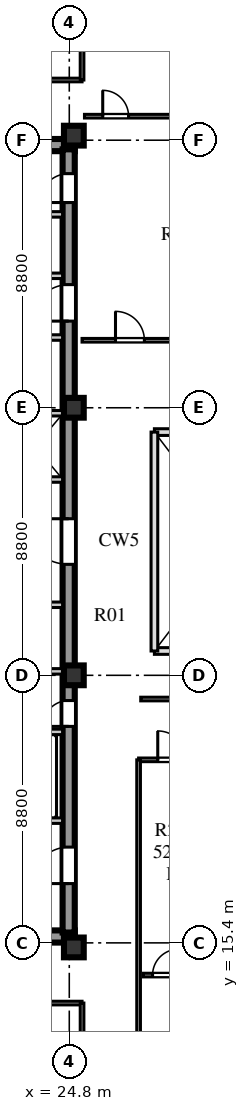
"""IFC4 building model, lengths in metres.
Left out: names, types, materials, properties, quantities, classifications, styles, units other than length and angle.
Written with IfcOpenShell. Run it as: python <this file> out.ifc"""

import sys

from ifc_helpers import new_model, si_unit, direction, frame, frame_2d, origin, origin_2d, place, context, subcontext, project, spatial, rectangle, extrude, element, fill, save


model = new_model("IFC4")
c1 = context("Model", 3, precision=1e-05, world=origin(), true_north=direction((0.0, 1.0)))
c2 = subcontext(c1, "Body", "Model", "MODEL_VIEW")
j1 = project(units=[si_unit("LENGTHUNIT", "METRE"), si_unit("PLANEANGLEUNIT", "RADIAN")], contexts=[c1])
p1 = place(None, origin())
s1 = spatial("IfcSite", under=j1, at=p1, CompositionType="ELEMENT")
p2 = place(p1, origin())
s2 = spatial("IfcBuilding", under=s1, at=p2, CompositionType="ELEMENT")
p3 = place(p2, frame((0.0, 0.0, 214.1)))
s3 = spatial("IfcBuildingStorey", under=s2, at=p3, CompositionType="ELEMENT", Elevation=214.1)
for number, where, z_axis, x_axis in (
    (1, (15.5, 15.61, 0.0), (0.0, 0.0, 1.0), (1.0, 0.0, 0.0)),
    (2, (15.5, 41.64, 0.0), (0.0, 0.0, 1.0), (1.0, 0.0, 0.0)),
):
    element("IfcWall", number, at=place(p3, frame(where, z_axis=z_axis, x_axis=x_axis)), inside=s3, PredefinedType="SHEAR", context=c2, shape_type="SweptSolid", body=[
        extrude(rectangle(XDim=9.48, YDim=0.4, at=frame_2d((4.74, 0.0))), origin(), (0.0, 0.0, 1.0), 3.66),
    ])
p4 = place(p3, frame((24.78, 15.74, 0.0), z_axis=(0.0, 0.0, 1.0), x_axis=(0.0, 1.0, 0.0)))
e3 = element("IfcWall", 3, at=p4, inside=s3, PredefinedType="SHEAR", context=c2, shape_type="SweptSolid", body=[
    extrude(rectangle(XDim=25.76, YDim=0.4, at=frame_2d((12.88, 0.0))), origin(), (0.0, 0.0, 1.0), 3.66),
])
p5 = place(p4, frame((1.61, 0.0, 0.0)))
e4 = element("IfcOpeningElement", 4, at=p5, cuts=e3, PredefinedType="OPENING", context=c2, shape_type="SweptSolid", body=[
    extrude(rectangle(XDim=1.2, YDim=2.1, at=frame_2d((0.6, 1.05))), frame((0.0, 0.21, 0.0), z_axis=(0.0, -1.0, 0.0), x_axis=(1.0, 0.0, 0.0)), (0.0, 0.0, 1.0), 0.42),
])
p6 = place(p4, frame((6.78, 0.0, 0.0)))
e5 = element("IfcOpeningElement", 5, at=p6, cuts=e3, PredefinedType="OPENING", context=c2, shape_type="SweptSolid", body=[
    extrude(rectangle(XDim=0.85, YDim=2.06, at=frame_2d((0.425, 1.03))), frame((0.0, 0.21, 0.0), z_axis=(0.0, -1.0, 0.0), x_axis=(1.0, 0.0, 0.0)), (0.0, 0.0, 1.0), 0.42),
])
p7 = place(p4, frame((12.11, 0.0, 0.0)))
e6 = element("IfcOpeningElement", 6, at=p7, cuts=e3, PredefinedType="OPENING", context=c2, shape_type="SweptSolid", body=[
    extrude(rectangle(XDim=1.5, YDim=2.12, at=frame_2d((0.75, 1.06))), frame((0.0, 0.21, 0.0), z_axis=(0.0, -1.0, 0.0), x_axis=(1.0, 0.0, 0.0)), (0.0, 0.0, 1.0), 0.42),
])
p8 = place(p4, frame((20.11, 0.0, 0.0)))
e7 = element("IfcOpeningElement", 7, at=p8, cuts=e3, PredefinedType="OPENING", context=c2, shape_type="SweptSolid", body=[
    extrude(rectangle(XDim=1.2, YDim=2.12, at=frame_2d((0.6, 1.06))), frame((0.0, 0.21, 0.0), z_axis=(0.0, -1.0, 0.0), x_axis=(1.0, 0.0, 0.0)), (0.0, 0.0, 1.0), 0.42),
])
p9 = place(p4, frame((24.01, 0.0, 0.0)))
e8 = element("IfcOpeningElement", 8, at=p9, cuts=e3, PredefinedType="OPENING", context=c2, shape_type="SweptSolid", body=[
    extrude(rectangle(XDim=0.95, YDim=2.1, at=frame_2d((0.475, 1.05))), frame((0.0, 0.21, 0.0), z_axis=(0.0, -1.0, 0.0), x_axis=(1.0, 0.0, 0.0)), (0.0, 0.0, 1.0), 0.42),
])
for number, where, z_axis, x_axis in (
    (9, (24.95, 15.25, 0.0), (0.0, 0.0, 1.0), (1.0, 0.0, 0.0)),
    (10, (24.95, 24.2, 0.0), (0.0, 0.0, 1.0), (1.0, 0.0, 0.0)),
    (11, (24.95, 33.0, 0.0), (0.0, 0.0, 1.0), (1.0, 0.0, 0.0)),
    (12, (24.95, 41.95, 0.0), (0.0, 0.0, 1.0), (1.0, 0.0, 0.0)),
):
    element("IfcColumn", number, at=place(p3, frame(where, z_axis=z_axis, x_axis=x_axis)), inside=s3, PredefinedType="COLUMN", context=c2, shape_type="SweptSolid", body=[
        extrude(rectangle(XDim=0.65, YDim=0.65, at=origin_2d()), origin(), (0.0, 0.0, 1.0), 3.66),
    ])
p10 = place(p3, frame((19.64, 19.42, 0.0), z_axis=(0.0, 0.0, 1.0), x_axis=(1.0, 0.0, 0.0)))
e13 = element("IfcWall", 13, at=p10, inside=s3, PredefinedType="SOLIDWALL", context=c2, shape_type="SweptSolid", body=[
    extrude(rectangle(XDim=4.94, YDim=0.18, at=frame_2d((2.47, 0.0))), origin(), (0.0, 0.0, 1.0), 3.66),
])
p11 = place(p10, frame((0.72, 0.0, 0.0)))
e14 = element("IfcOpeningElement", 14, at=p11, cuts=e13, PredefinedType="OPENING", context=c2, shape_type="SweptSolid", body=[
    extrude(rectangle(XDim=1.1, YDim=2.1, at=frame_2d((0.55, 1.05))), frame((0.0, 0.1, 0.0), z_axis=(0.0, -1.0, 0.0), x_axis=(1.0, 0.0, 0.0)), (0.0, 0.0, 1.0), 0.2),
])
p12 = place(p10, frame((3.02, 0.0, 0.0)))
e15 = element("IfcOpeningElement", 15, at=p12, cuts=e13, PredefinedType="OPENING", context=c2, shape_type="SweptSolid", body=[
    extrude(rectangle(XDim=1.1, YDim=2.1, at=frame_2d((0.55, 1.05))), frame((0.0, 0.1, 0.0), z_axis=(0.0, -1.0, 0.0), x_axis=(1.0, 0.0, 0.0)), (0.0, 0.0, 1.0), 0.2),
])
p13 = place(p3, frame((19.64, 22.34, 0.0), z_axis=(0.0, 0.0, 1.0), x_axis=(1.0, 0.0, 0.0)))
e16 = element("IfcWall", 16, at=p13, inside=s3, PredefinedType="SOLIDWALL", context=c2, shape_type="SweptSolid", body=[
    extrude(rectangle(XDim=4.94, YDim=0.18, at=frame_2d((2.47, 0.0))), origin(), (0.0, 0.0, 1.0), 3.66),
])
p14 = place(p3, frame((15.9, 26.52, 0.0), z_axis=(0.0, 0.0, 1.0), x_axis=(1.0, 0.0, 0.0)))
e17 = element("IfcWall", 17, at=p14, inside=s3, PredefinedType="SOLIDWALL", context=c2, shape_type="SweptSolid", body=[
    extrude(rectangle(XDim=8.68, YDim=0.18, at=frame_2d((4.34, 0.0))), origin(), (0.0, 0.0, 1.0), 3.66),
])
p15 = place(p14, frame((2.5, 0.0, 0.0)))
e18 = element("IfcOpeningElement", 18, at=p15, cuts=e17, PredefinedType="OPENING", context=c2, shape_type="SweptSolid", body=[
    extrude(rectangle(XDim=0.95, YDim=2.1, at=frame_2d((0.475, 1.05))), frame((0.0, 0.1, 0.0), z_axis=(0.0, -1.0, 0.0), x_axis=(1.0, 0.0, 0.0)), (0.0, 0.0, 1.0), 0.2),
])
p16 = place(p14, frame((6.0, 0.0, 0.0)))
e19 = element("IfcOpeningElement", 19, at=p16, cuts=e17, PredefinedType="OPENING", context=c2, shape_type="SweptSolid", body=[
    extrude(rectangle(XDim=0.95, YDim=2.1, at=frame_2d((0.475, 1.05))), frame((0.0, 0.1, 0.0), z_axis=(0.0, -1.0, 0.0), x_axis=(1.0, 0.0, 0.0)), (0.0, 0.0, 1.0), 0.2),
])
p17 = place(p3, frame((15.9, 24.33, 0.0), z_axis=(0.0, 0.0, 1.0), x_axis=(1.0, 0.0, 0.0)))
e20 = element("IfcWall", 20, at=p17, inside=s3, PredefinedType="SOLIDWALL", context=c2, shape_type="SweptSolid", body=[
    extrude(rectangle(XDim=8.68, YDim=0.18, at=frame_2d((4.34, 0.0))), origin(), (0.0, 0.0, 1.0), 3.06),
])
p18 = place(p3, frame((15.9, 30.64, 0.0), z_axis=(0.0, 0.0, 1.0), x_axis=(1.0, 0.0, 0.0)))
e21 = element("IfcWall", 21, at=p18, inside=s3, PredefinedType="SOLIDWALL", context=c2, shape_type="SweptSolid", body=[
    extrude(rectangle(XDim=8.68, YDim=0.18, at=frame_2d((4.34, 0.0))), origin(), (0.0, 0.0, 1.0), 3.66),
])
p19 = place(p3, frame((15.9, 32.82, 0.0), z_axis=(0.0, 0.0, 1.0), x_axis=(1.0, 0.0, 0.0)))
e22 = element("IfcWall", 22, at=p19, inside=s3, PredefinedType="SOLIDWALL", context=c2, shape_type="SweptSolid", body=[
    extrude(rectangle(XDim=8.68, YDim=0.18, at=frame_2d((4.34, 0.0))), origin(), (0.0, 0.0, 1.0), 3.06),
])
p20 = place(p3, frame((22.02, 35.31, 0.0), z_axis=(0.0, 0.0, 1.0), x_axis=(1.0, 0.0, 0.0)))
e23 = element("IfcWall", 23, at=p20, inside=s3, PredefinedType="SOLIDWALL", context=c2, shape_type="SweptSolid", body=[
    extrude(rectangle(XDim=2.56, YDim=0.18, at=frame_2d((1.28, 0.0))), origin(), (0.0, 0.0, 1.0), 3.66),
])
p21 = place(p20, frame((0.55, 0.0, 0.0)))
e24 = element("IfcOpeningElement", 24, at=p21, cuts=e23, PredefinedType="OPENING", context=c2, shape_type="SweptSolid", body=[
    extrude(rectangle(XDim=1.0, YDim=2.1, at=frame_2d((0.5, 1.05))), frame((0.0, 0.1, 0.0), z_axis=(0.0, -1.0, 0.0), x_axis=(1.0, 0.0, 0.0)), (0.0, 0.0, 1.0), 0.2),
])
p22 = place(p3, frame((19.64, 37.34, 0.0), z_axis=(0.0, 0.0, 1.0), x_axis=(1.0, 0.0, 0.0)))
e25 = element("IfcWall", 25, at=p22, inside=s3, PredefinedType="SOLIDWALL", context=c2, shape_type="SweptSolid", body=[
    extrude(rectangle(XDim=4.94, YDim=0.18, at=frame_2d((2.47, 0.0))), origin(), (0.0, 0.0, 1.0), 3.66),
])
p23 = place(p22, frame((0.45, 0.0, 0.0)))
e26 = element("IfcOpeningElement", 26, at=p23, cuts=e25, PredefinedType="OPENING", context=c2, shape_type="SweptSolid", body=[
    extrude(rectangle(XDim=1.0, YDim=2.1, at=frame_2d((0.5, 1.05))), frame((0.0, 0.1, 0.0), z_axis=(0.0, -1.0, 0.0), x_axis=(1.0, 0.0, 0.0)), (0.0, 0.0, 1.0), 0.2),
])
p24 = place(p22, frame((2.5, 0.0, 0.0)))
e27 = element("IfcOpeningElement", 27, at=p24, cuts=e25, PredefinedType="OPENING", context=c2, shape_type="SweptSolid", body=[
    extrude(rectangle(XDim=1.0, YDim=2.1, at=frame_2d((0.5, 1.05))), frame((0.0, 0.1, 0.0), z_axis=(0.0, -1.0, 0.0), x_axis=(1.0, 0.0, 0.0)), (0.0, 0.0, 1.0), 0.2),
])
p25 = place(p3, frame((19.64, 39.36, 0.0), z_axis=(0.0, 0.0, 1.0), x_axis=(1.0, 0.0, 0.0)))
e28 = element("IfcWall", 28, at=p25, inside=s3, PredefinedType="SOLIDWALL", context=c2, shape_type="SweptSolid", body=[
    extrude(rectangle(XDim=4.94, YDim=0.18, at=frame_2d((2.47, 0.0))), origin(), (0.0, 0.0, 1.0), 3.66),
])
p26 = place(p3, frame((27.08, 21.42, 0.0), z_axis=(0.0, 0.0, 1.0), x_axis=(1.0, 0.0, 0.0)))
e29 = element("IfcWall", 29, at=p26, inside=s3, PredefinedType="PARTITIONING", context=c2, shape_type="SweptSolid", body=[
    extrude(rectangle(XDim=12.07, YDim=0.12, at=frame_2d((6.035, 0.0))), origin(), (0.0, 0.0, 1.0), 3.31),
])
p27 = place(p26, frame((0.63, 0.0, 0.0)))
e30 = element("IfcOpeningElement", 30, at=p27, cuts=e29, PredefinedType="OPENING", context=c2, shape_type="SweptSolid", body=[
    extrude(rectangle(XDim=0.95, YDim=2.1, at=frame_2d((0.475, 1.05))), frame((0.0, 0.07, 0.0), z_axis=(0.0, -1.0, 0.0), x_axis=(1.0, 0.0, 0.0)), (0.0, 0.0, 1.0), 0.14),
])
p28 = place(p3, frame((27.08, 7.88, 0.0), z_axis=(0.0, 0.0, 1.0), x_axis=(0.0, 1.0, 0.0)))
e31 = element("IfcWall", 31, at=p28, inside=s3, PredefinedType="PARTITIONING", context=c2, shape_type="SweptSolid", body=[
    extrude(rectangle(XDim=13.54, YDim=0.12, at=frame_2d((6.77, 0.0))), origin(), (0.0, 0.0, 1.0), 3.66),
])
p29 = place(p3, frame((27.15, 23.42, 0.0), z_axis=(0.0, 0.0, 1.0), x_axis=(1.0, 0.0, 0.0)))
e32 = element("IfcWall", 32, at=p29, inside=s3, PredefinedType="PARTITIONING", context=c2, shape_type="SweptSolid", body=[
    extrude(rectangle(XDim=6.0, YDim=0.12, at=frame_2d((3.0, 0.0))), origin(), (0.0, 0.0, 1.0), 3.66),
])
p30 = place(p3, frame((25.22, 35.22, 0.0), z_axis=(0.0, 0.0, 1.0), x_axis=(1.0, 0.0, 0.0)))
e33 = element("IfcWall", 33, at=p30, inside=s3, PredefinedType="PARTITIONING", context=c2, shape_type="SweptSolid", body=[
    extrude(rectangle(XDim=9.5, YDim=0.12, at=frame_2d((4.75, 0.0))), origin(), (0.0, 0.0, 1.0), 3.66),
])
p31 = place(p30, frame((1.1, 0.0, 0.0)))
e34 = element("IfcOpeningElement", 34, at=p31, cuts=e33, PredefinedType="OPENING", context=c2, shape_type="SweptSolid", body=[
    extrude(rectangle(XDim=0.95, YDim=2.1, at=frame_2d((0.475, 1.05))), frame((0.0, 0.07, 0.0), z_axis=(0.0, -1.0, 0.0), x_axis=(1.0, 0.0, 0.0)), (0.0, 0.0, 1.0), 0.14),
])
p32 = place(p3, frame((13.4, 13.42, 0.0), z_axis=(0.0, 0.0, 1.0), x_axis=(1.0, 0.0, 0.0)))
e35 = element("IfcWall", 35, at=p32, inside=s3, PredefinedType="PARTITIONING", context=c2, shape_type="SweptSolid", body=[
    extrude(rectangle(XDim=11.82, YDim=0.12, at=frame_2d((5.91, 0.0))), origin(), (0.0, 0.0, 1.0), 3.66),
])
p33 = place(p32, frame((3.2, 0.0, 0.0)))
e36 = element("IfcOpeningElement", 36, at=p33, cuts=e35, PredefinedType="OPENING", context=c2, shape_type="SweptSolid", body=[
    extrude(rectangle(XDim=0.95, YDim=2.08, at=frame_2d((0.475, 1.04))), frame((0.0, 0.07, 0.0), z_axis=(0.0, -1.0, 0.0), x_axis=(1.0, 0.0, 0.0)), (0.0, 0.0, 1.0), 0.14),
])
p34 = place(p3, frame((25.22, 7.88, 0.0), z_axis=(0.0, 0.0, 1.0), x_axis=(0.0, 1.0, 0.0)))
e37 = element("IfcWall", 37, at=p34, inside=s3, PredefinedType="PARTITIONING", context=c2, shape_type="SweptSolid", body=[
    extrude(rectangle(XDim=5.54, YDim=0.12, at=frame_2d((2.77, 0.0))), origin(), (0.0, 0.0, 1.0), 3.21),
])
p35 = place(p3, frame((13.4, 43.78, 0.0), z_axis=(0.0, 0.0, 1.0), x_axis=(1.0, 0.0, 0.0)))
e38 = element("IfcWall", 38, at=p35, inside=s3, PredefinedType="PARTITIONING", context=c2, shape_type="SweptSolid", body=[
    extrude(rectangle(XDim=11.82, YDim=0.12, at=frame_2d((5.91, 0.0))), origin(), (0.0, 0.0, 1.0), 3.66),
])
p36 = place(p35, frame((3.2, 0.0, 0.0)))
e39 = element("IfcOpeningElement", 39, at=p36, cuts=e38, PredefinedType="OPENING", context=c2, shape_type="SweptSolid", body=[
    extrude(rectangle(XDim=0.95, YDim=2.08, at=frame_2d((0.475, 1.04))), frame((0.0, 0.07, 0.0), z_axis=(0.0, -1.0, 0.0), x_axis=(1.0, 0.0, 0.0)), (0.0, 0.0, 1.0), 0.14),
])
p37 = place(p3, frame((25.22, 43.78, 0.0), z_axis=(0.0, 0.0, 1.0), x_axis=(0.0, 1.0, 0.0)))
e40 = element("IfcWall", 40, at=p37, inside=s3, PredefinedType="PARTITIONING", context=c2, shape_type="SweptSolid", body=[
    extrude(rectangle(XDim=5.54, YDim=0.12, at=frame_2d((2.77, 0.0))), origin(), (0.0, 0.0, 1.0), 3.21),
])
p38 = place(p3, frame((27.24, 14.341, 0.0), z_axis=(0.0, 0.0, 1.0), x_axis=(1.0, 0.0, 0.0)))
e41 = element("IfcWall", 41, at=p38, inside=s3, PredefinedType="PARTITIONING", context=c2, shape_type="SweptSolid", body=[
    extrude(rectangle(XDim=11.83, YDim=0.12, at=frame_2d((5.915, 0.0))), origin(), (0.0, 0.0, 1.0), 3.66),
])
p39 = place(p38, frame((0.3, 0.0, 0.0)))
e42 = element("IfcOpeningElement", 42, at=p39, cuts=e41, PredefinedType="OPENING", context=c2, shape_type="SweptSolid", body=[
    extrude(rectangle(XDim=0.85, YDim=2.08, at=frame_2d((0.425, 1.04))), frame((0.0, 0.07, 0.0), z_axis=(0.0, -1.0, 0.0), x_axis=(1.0, 0.0, 0.0)), (0.0, 0.0, 1.0), 0.14),
])
p40 = place(p38, frame((3.135, 0.0, 0.0)))
e43 = element("IfcOpeningElement", 43, at=p40, cuts=e41, PredefinedType="OPENING", context=c2, shape_type="SweptSolid", body=[
    extrude(rectangle(XDim=0.85, YDim=2.08, at=frame_2d((0.425, 1.04))), frame((0.0, 0.07, 0.0), z_axis=(0.0, -1.0, 0.0), x_axis=(1.0, 0.0, 0.0)), (0.0, 0.0, 1.0), 0.14),
])
p41 = place(p3, frame((25.3, 42.59, 0.0), z_axis=(0.0, 0.0, 1.0), x_axis=(1.0, 0.0, 0.0)))
e44 = element("IfcWall", 44, at=p41, inside=s3, PredefinedType="PARTITIONING", context=c2, shape_type="SweptSolid", body=[
    extrude(rectangle(XDim=9.34, YDim=0.12, at=frame_2d((4.67, 0.0))), origin(), (0.0, 0.0, 1.0), 3.66),
])
p42 = place(p41, frame((0.6, 0.0, 0.0)))
e45 = element("IfcOpeningElement", 45, at=p42, cuts=e44, PredefinedType="OPENING", context=c2, shape_type="SweptSolid", body=[
    extrude(rectangle(XDim=0.85, YDim=2.08, at=frame_2d((0.425, 1.04))), frame((0.0, 0.07, 0.0), z_axis=(0.0, -1.0, 0.0), x_axis=(1.0, 0.0, 0.0)), (0.0, 0.0, 1.0), 0.14),
])
p43 = place(p41, frame((3.573, 0.0, 0.0)))
e46 = element("IfcOpeningElement", 46, at=p43, cuts=e44, PredefinedType="OPENING", context=c2, shape_type="SweptSolid", body=[
    extrude(rectangle(XDim=0.85, YDim=2.08, at=frame_2d((0.425, 1.04))), frame((0.0, 0.07, 0.0), z_axis=(0.0, -1.0, 0.0), x_axis=(1.0, 0.0, 0.0)), (0.0, 0.0, 1.0), 0.14),
])
p44 = place(p5, frame((1.2, 0.0, 0.0), z_axis=(0.0, 0.0, 1.0), x_axis=(-1.0, 0.0, 0.0)))
e47 = element("IfcDoor", 47, at=p44, inside=s3, OperationType="SINGLE_SWING_RIGHT", PredefinedType="DOOR", context=c2, shape_type="SweptSolid", body=[
    extrude(rectangle(XDim=1.2, YDim=2.1, at=frame_2d((0.6, 1.05))), frame((0.0, 0.025, 0.0), z_axis=(0.0, -1.0, 0.0), x_axis=(1.0, 0.0, 0.0)), (0.0, 0.0, 1.0), 0.05),
])
fill(e4, e47)
p45 = place(p6, frame((0.85, 0.0, 0.0), z_axis=(0.0, 0.0, 1.0), x_axis=(-1.0, 0.0, 0.0)))
e48 = element("IfcDoor", 48, at=p45, inside=s3, OperationType="SINGLE_SWING_RIGHT", PredefinedType="DOOR", context=c2, shape_type="SweptSolid", body=[
    extrude(rectangle(XDim=0.85, YDim=2.06, at=frame_2d((0.425, 1.03))), frame((0.0, 0.025, 0.0), z_axis=(0.0, -1.0, 0.0), x_axis=(1.0, 0.0, 0.0)), (0.0, 0.0, 1.0), 0.05),
])
fill(e5, e48)
p46 = place(p7, frame((1.5, 0.0, 0.0), z_axis=(0.0, 0.0, 1.0), x_axis=(-1.0, 0.0, 0.0)))
e49 = element("IfcDoor", 49, at=p46, inside=s3, OperationType="SINGLE_SWING_LEFT", PredefinedType="DOOR", context=c2, shape_type="SweptSolid", body=[
    extrude(rectangle(XDim=1.5, YDim=2.12, at=frame_2d((0.75, 1.06))), frame((0.0, 0.025, 0.0), z_axis=(0.0, -1.0, 0.0), x_axis=(1.0, 0.0, 0.0)), (0.0, 0.0, 1.0), 0.05),
])
fill(e6, e49)
p47 = place(p8, frame((1.2, 0.0, 0.0), z_axis=(0.0, 0.0, 1.0), x_axis=(-1.0, 0.0, 0.0)))
e50 = element("IfcDoor", 50, at=p47, inside=s3, OperationType="SINGLE_SWING_RIGHT", PredefinedType="DOOR", context=c2, shape_type="SweptSolid", body=[
    extrude(rectangle(XDim=1.2, YDim=2.12, at=frame_2d((0.6, 1.06))), frame((0.0, 0.025, 0.0), z_axis=(0.0, -1.0, 0.0), x_axis=(1.0, 0.0, 0.0)), (0.0, 0.0, 1.0), 0.05),
])
fill(e7, e50)
p48 = place(p9, frame((0.95, 0.0, 0.0), z_axis=(0.0, 0.0, 1.0), x_axis=(-1.0, 0.0, 0.0)))
e51 = element("IfcDoor", 51, at=p48, inside=s3, OperationType="SINGLE_SWING_RIGHT", PredefinedType="DOOR", context=c2, shape_type="SweptSolid", body=[
    extrude(rectangle(XDim=0.95, YDim=2.1, at=frame_2d((0.475, 1.05))), frame((0.0, 0.025, 0.0), z_axis=(0.0, -1.0, 0.0), x_axis=(1.0, 0.0, 0.0)), (0.0, 0.0, 1.0), 0.05),
])
fill(e8, e51)
p49 = place(p39, frame((0.85, 0.0, 0.0), z_axis=(0.0, 0.0, 1.0), x_axis=(-1.0, 0.0, 0.0)))
e52 = element("IfcDoor", 52, at=p49, inside=s3, OperationType="SINGLE_SWING_LEFT", PredefinedType="DOOR", context=c2, shape_type="SweptSolid", body=[
    extrude(rectangle(XDim=0.85, YDim=2.08, at=frame_2d((0.425, 1.04))), frame((0.0, 0.025, 0.0), z_axis=(0.0, -1.0, 0.0), x_axis=(1.0, 0.0, 0.0)), (0.0, 0.0, 1.0), 0.05),
])
fill(e42, e52)
p50 = place(p27, frame((0.95, 0.0, 0.0), z_axis=(0.0, 0.0, 1.0), x_axis=(-1.0, 0.0, 0.0)))
e53 = element("IfcDoor", 53, at=p50, inside=s3, OperationType="SINGLE_SWING_RIGHT", PredefinedType="DOOR", context=c2, shape_type="SweptSolid", body=[
    extrude(rectangle(XDim=0.95, YDim=2.1, at=frame_2d((0.475, 1.05))), frame((0.0, 0.025, 0.0), z_axis=(0.0, -1.0, 0.0), x_axis=(1.0, 0.0, 0.0)), (0.0, 0.0, 1.0), 0.05),
])
fill(e30, e53)
p51 = place(p42, origin())
e54 = element("IfcDoor", 54, at=p51, inside=s3, OperationType="SINGLE_SWING_LEFT", PredefinedType="DOOR", context=c2, shape_type="SweptSolid", body=[
    extrude(rectangle(XDim=0.85, YDim=2.08, at=frame_2d((0.425, 1.04))), frame((0.0, 0.025, 0.0), z_axis=(0.0, -1.0, 0.0), x_axis=(1.0, 0.0, 0.0)), (0.0, 0.0, 1.0), 0.05),
])
fill(e45, e54)
p52 = place(p31, origin())
e55 = element("IfcDoor", 55, at=p52, inside=s3, OperationType="SINGLE_SWING_LEFT", PredefinedType="DOOR", context=c2, shape_type="SweptSolid", body=[
    extrude(rectangle(XDim=0.95, YDim=2.1, at=frame_2d((0.475, 1.05))), frame((0.0, 0.025, 0.0), z_axis=(0.0, -1.0, 0.0), x_axis=(1.0, 0.0, 0.0)), (0.0, 0.0, 1.0), 0.05),
])
fill(e34, e55)
save(model, sys.argv[1])
